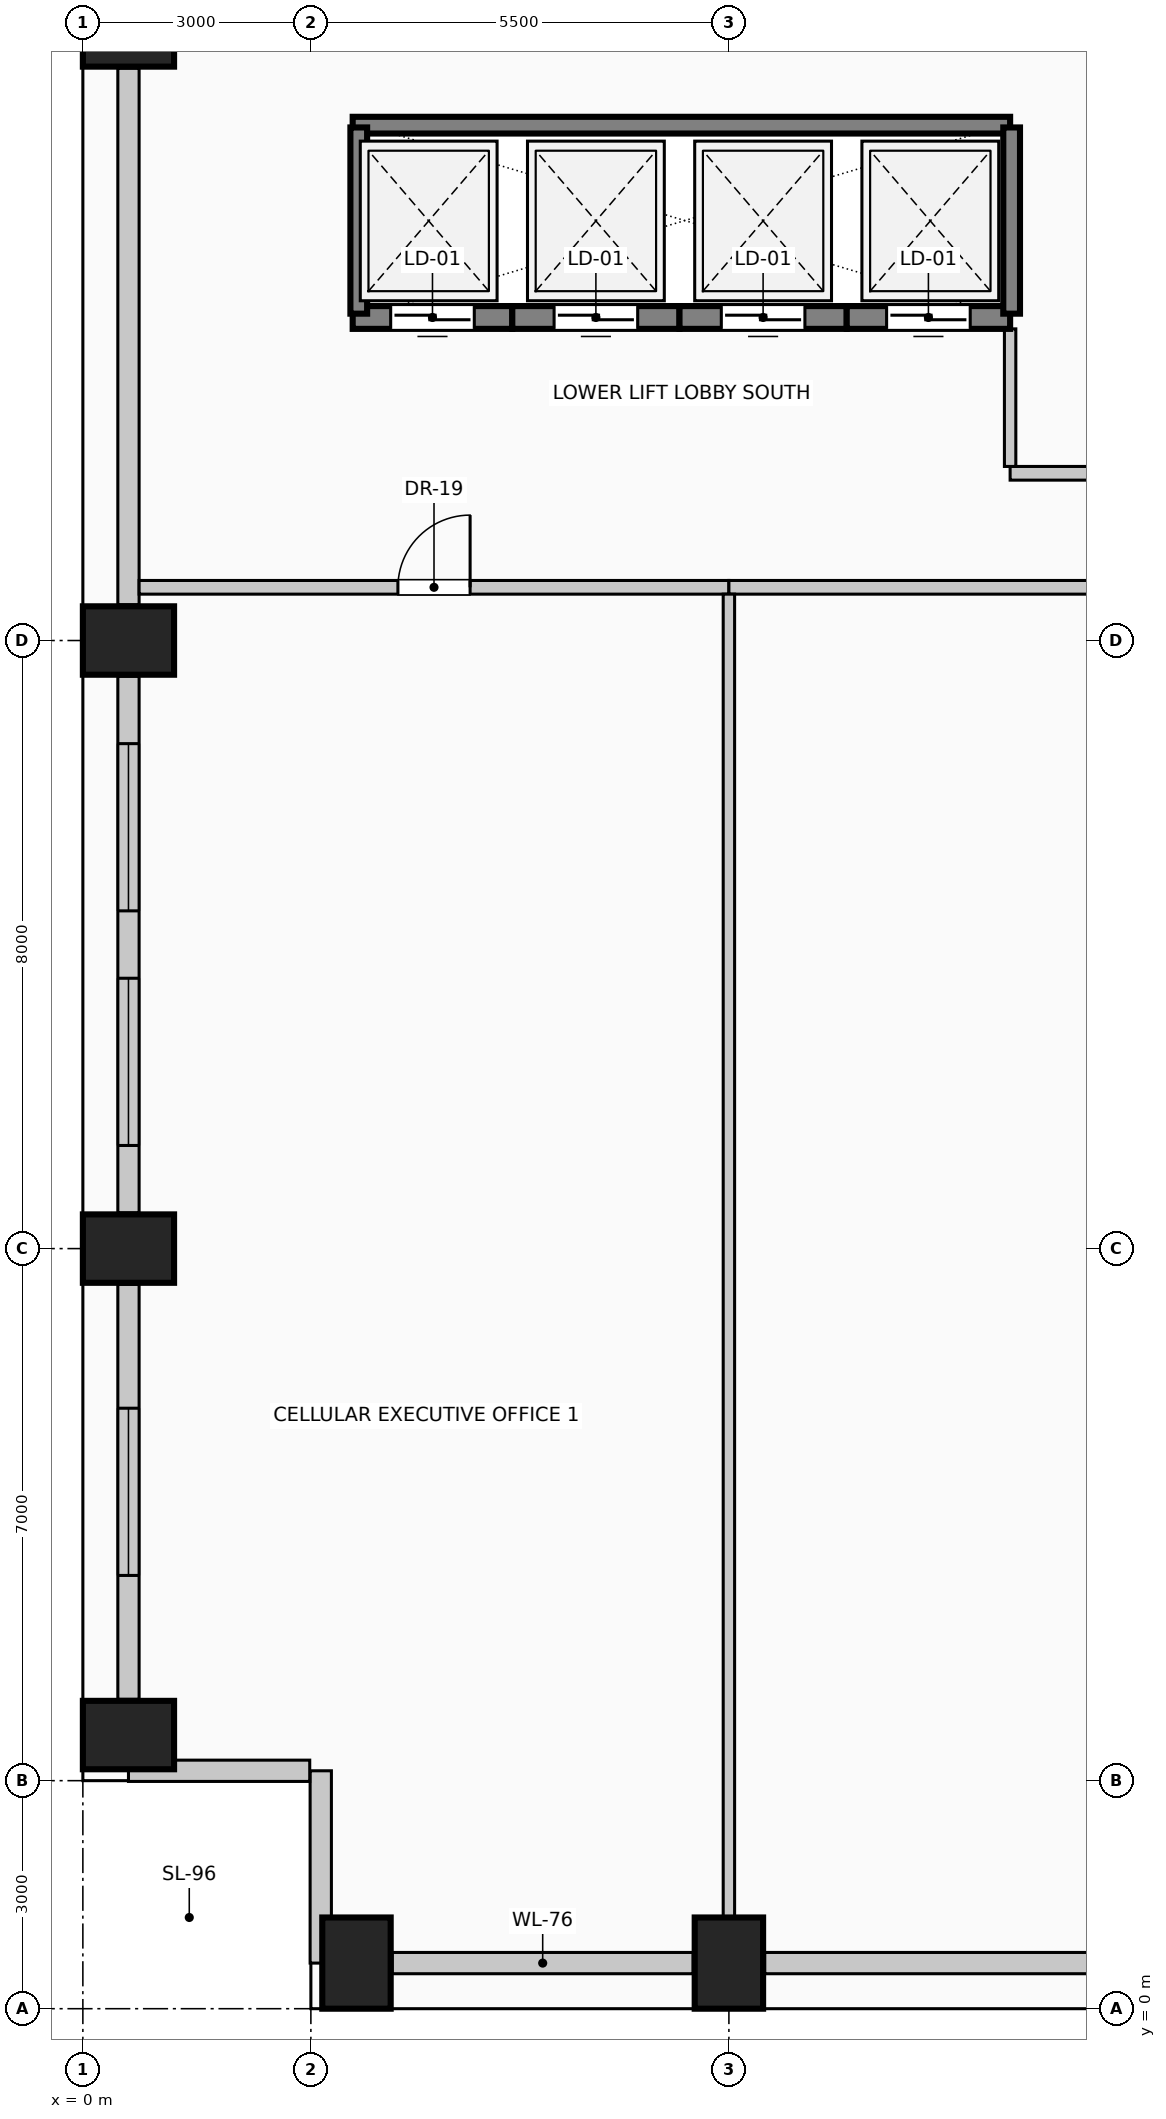
"""IFC4 building model, lengths in metres.
Left out: names, types, materials, properties, quantities, classifications, styles, units other than length and angle.
Written with IfcOpenShell. Run it as: python <this file> out.ifc"""

import sys

from ifc_helpers import new_model, si_unit, direction, frame, frame_2d, origin, origin_2d, place, context, subcontext, project, spatial, rectangle, extrude, element, fill, save


model = new_model("IFC4")
c1 = context("Model", 3, precision=1e-05, world=origin(), true_north=direction((0.0, 1.0)))
c2 = subcontext(c1, "Body", "Model", "MODEL_VIEW")
j1 = project(units=[si_unit("LENGTHUNIT", "METRE"), si_unit("PLANEANGLEUNIT", "RADIAN")], contexts=[c1])
p1 = place(None, origin())
s1 = spatial("IfcSite", under=j1, at=p1, CompositionType="ELEMENT")
p2 = place(p1, origin())
s2 = spatial("IfcBuilding", under=s1, at=p2, CompositionType="ELEMENT")
p3 = place(p2, frame((0.0, 0.0, 66.6)))
s3 = spatial("IfcBuildingStorey", under=s2, at=p3, CompositionType="ELEMENT", Elevation=66.6)
for number, where, z_axis, x_axis in (
    (1, (3.6, 0.6, 0.0), (0.0, 0.0, 1.0), (1.0, 0.0, 0.0)),
    (2, (8.5, 0.6, 0.0), (0.0, 0.0, 1.0), (1.0, 0.0, 0.0)),
    (3, (0.6, 3.6, 0.0), (0.0, 0.0, 1.0), (0.0, 1.0, 0.0)),
    (4, (0.6, 10.0, 0.0), (0.0, 0.0, 1.0), (0.0, 1.0, 0.0)),
    (5, (0.6, 18.0, 0.0), (0.0, 0.0, 1.0), (0.0, 1.0, 0.0)),
    (6, (0.6, 26.0, 0.0), (0.0, 0.0, 1.0), (0.0, 1.0, 0.0)),
):
    element("IfcColumn", number, at=place(p3, frame(where, z_axis=z_axis, x_axis=x_axis)), inside=s3, PredefinedType="COLUMN", context=c2, shape_type="SweptSolid", body=[
        extrude(rectangle(XDim=0.9, YDim=1.2, at=origin_2d()), origin(), (0.0, 0.0, 1.0), 4.0),
    ])
p4 = place(p3, frame((8.03, 0.6, 0.0), z_axis=(0.0, 0.0, 1.0), x_axis=(-1.0, 0.0, 0.0)))
e7 = element("IfcWall", 7, at=p4, inside=s3, PredefinedType="SOLIDWALL", context=c2, shape_type="SweptSolid", body=[
    extrude(rectangle(XDim=3.96, YDim=0.28, at=frame_2d((1.98, 0.0))), origin(), (0.0, 0.0, 1.0), 2.85),
])
p5 = place(p3, frame((13.53, 0.6, 0.0), z_axis=(0.0, 0.0, 1.0), x_axis=(-1.0, 0.0, 0.0)))
e8 = element("IfcWall", 8, at=p5, inside=s3, PredefinedType="SOLIDWALL", context=c2, shape_type="SweptSolid", body=[
    extrude(rectangle(XDim=4.56, YDim=0.28, at=frame_2d((2.28, 0.0))), origin(), (0.0, 0.0, 1.0), 2.85),
])
p6 = place(p3, frame((0.6, 4.07, 0.0), z_axis=(0.0, 0.0, 1.0), x_axis=(0.0, 1.0, 0.0)))
e9 = element("IfcWall", 9, at=p6, inside=s3, PredefinedType="SOLIDWALL", context=c2, shape_type="SweptSolid", body=[
    extrude(rectangle(XDim=5.46, YDim=0.28, at=frame_2d((2.73, 0.0))), origin(), (0.0, 0.0, 1.0), 2.85),
])
p7 = place(p6, frame((1.63, 0.0, 0.5)))
e10 = element("IfcOpeningElement", 10, at=p7, cuts=e9, PredefinedType="OPENING", context=c2, shape_type="SweptSolid", body=[
    extrude(rectangle(XDim=2.2, YDim=1.95, at=frame_2d((1.1, 0.975))), frame((0.0, 0.15, 0.0), z_axis=(0.0, -1.0, 0.0), x_axis=(1.0, 0.0, 0.0)), (0.0, 0.0, 1.0), 0.3),
])
p8 = place(p3, frame((0.6, 10.47, 0.0), z_axis=(0.0, 0.0, 1.0), x_axis=(0.0, 1.0, 0.0)))
e11 = element("IfcWall", 11, at=p8, inside=s3, PredefinedType="SOLIDWALL", context=c2, shape_type="SweptSolid", body=[
    extrude(rectangle(XDim=7.06, YDim=0.28, at=frame_2d((3.53, 0.0))), origin(), (0.0, 0.0, 1.0), 2.85),
])
p9 = place(p8, frame((0.887, 0.0, 0.5)))
e12 = element("IfcOpeningElement", 12, at=p9, cuts=e11, PredefinedType="OPENING", context=c2, shape_type="SweptSolid", body=[
    extrude(rectangle(XDim=2.2, YDim=1.95, at=frame_2d((1.1, 0.975))), frame((0.0, 0.15, 0.0), z_axis=(0.0, -1.0, 0.0), x_axis=(1.0, 0.0, 0.0)), (0.0, 0.0, 1.0), 0.3),
])
p10 = place(p8, frame((3.973, 0.0, 0.5)))
e13 = element("IfcOpeningElement", 13, at=p10, cuts=e11, PredefinedType="OPENING", context=c2, shape_type="SweptSolid", body=[
    extrude(rectangle(XDim=2.2, YDim=1.95, at=frame_2d((1.1, 0.975))), frame((0.0, 0.15, 0.0), z_axis=(0.0, -1.0, 0.0), x_axis=(1.0, 0.0, 0.0)), (0.0, 0.0, 1.0), 0.3),
])
p11 = place(p3, frame((0.6, 18.47, 0.0), z_axis=(0.0, 0.0, 1.0), x_axis=(0.0, 1.0, 0.0)))
e14 = element("IfcWall", 14, at=p11, inside=s3, PredefinedType="SOLIDWALL", context=c2, shape_type="SweptSolid", body=[
    extrude(rectangle(XDim=7.06, YDim=0.28, at=frame_2d((3.53, 0.0))), origin(), (0.0, 0.0, 1.0), 2.85),
])
p12 = place(p3, frame((3.13, 0.6, 0.0), z_axis=(0.0, 0.0, 1.0), x_axis=(0.0, 1.0, 0.0)))
e15 = element("IfcWall", 15, at=p12, inside=s3, PredefinedType="SOLIDWALL", context=c2, shape_type="SweptSolid", body=[
    extrude(rectangle(XDim=2.53, YDim=0.28, at=frame_2d((1.265, 0.0))), origin(), (0.0, 0.0, 1.0), 3.7),
])
p13 = place(p3, frame((2.985, 3.13, 0.0), z_axis=(0.0, 0.0, 1.0), x_axis=(-1.0, 0.0, 0.0)))
e16 = element("IfcWall", 16, at=p13, inside=s3, PredefinedType="SOLIDWALL", context=c2, shape_type="SweptSolid", body=[
    extrude(rectangle(XDim=2.385, YDim=0.28, at=frame_2d((1.192, 0.0))), origin(), (0.0, 0.0, 1.0), 3.7),
])
p14 = place(p3, frame((5.65, 22.25, 0.0), z_axis=(0.0, 0.0, 1.0), x_axis=(-1.0, 0.0, 0.0)))
e17 = element("IfcWall", 17, at=p14, inside=s3, PredefinedType="SOLIDWALL", context=c2, shape_type="SweptSolid", body=[
    extrude(rectangle(XDim=2.1, YDim=0.3, at=frame_2d((1.05, 0.0))), origin(), (0.0, 0.0, 1.0), 4.0),
])
p15 = place(p14, frame((0.5, 0.0, 0.0)))
e18 = element("IfcOpeningElement", 18, at=p15, cuts=e17, PredefinedType="OPENING", context=c2, shape_type="SweptSolid", body=[
    extrude(rectangle(XDim=1.1, YDim=2.2, at=frame_2d((0.55, 1.1))), frame((0.0, 0.16, 0.0), z_axis=(0.0, -1.0, 0.0), x_axis=(1.0, 0.0, 0.0)), (0.0, 0.0, 1.0), 0.32),
])
p16 = place(p3, frame((7.85, 22.25, 0.0), z_axis=(0.0, 0.0, 1.0), x_axis=(-1.0, 0.0, 0.0)))
e19 = element("IfcWall", 19, at=p16, inside=s3, PredefinedType="SOLIDWALL", context=c2, shape_type="SweptSolid", body=[
    extrude(rectangle(XDim=2.2, YDim=0.3, at=frame_2d((1.1, 0.0))), origin(), (0.0, 0.0, 1.0), 4.0),
])
p17 = place(p16, frame((0.55, 0.0, 0.0)))
e20 = element("IfcOpeningElement", 20, at=p17, cuts=e19, PredefinedType="OPENING", context=c2, shape_type="SweptSolid", body=[
    extrude(rectangle(XDim=1.1, YDim=2.2, at=frame_2d((0.55, 1.1))), frame((0.0, 0.16, 0.0), z_axis=(0.0, -1.0, 0.0), x_axis=(1.0, 0.0, 0.0)), (0.0, 0.0, 1.0), 0.32),
])
p18 = place(p3, frame((10.05, 22.25, 0.0), z_axis=(0.0, 0.0, 1.0), x_axis=(-1.0, 0.0, 0.0)))
e21 = element("IfcWall", 21, at=p18, inside=s3, PredefinedType="SOLIDWALL", context=c2, shape_type="SweptSolid", body=[
    extrude(rectangle(XDim=2.2, YDim=0.3, at=frame_2d((1.1, 0.0))), origin(), (0.0, 0.0, 1.0), 4.0),
])
p19 = place(p18, frame((0.55, 0.0, 0.0)))
e22 = element("IfcOpeningElement", 22, at=p19, cuts=e21, PredefinedType="OPENING", context=c2, shape_type="SweptSolid", body=[
    extrude(rectangle(XDim=1.1, YDim=2.2, at=frame_2d((0.55, 1.1))), frame((0.0, 0.16, 0.0), z_axis=(0.0, -1.0, 0.0), x_axis=(1.0, 0.0, 0.0)), (0.0, 0.0, 1.0), 0.32),
])
p20 = place(p3, frame((12.2, 22.25, 0.0), z_axis=(0.0, 0.0, 1.0), x_axis=(-1.0, 0.0, 0.0)))
e23 = element("IfcWall", 23, at=p20, inside=s3, PredefinedType="SOLIDWALL", context=c2, shape_type="SweptSolid", body=[
    extrude(rectangle(XDim=2.15, YDim=0.3, at=frame_2d((1.075, 0.0))), origin(), (0.0, 0.0, 1.0), 4.0),
])
p21 = place(p20, frame((0.525, 0.0, 0.0)))
e24 = element("IfcOpeningElement", 24, at=p21, cuts=e23, PredefinedType="OPENING", context=c2, shape_type="SweptSolid", body=[
    extrude(rectangle(XDim=1.1, YDim=2.2, at=frame_2d((0.55, 1.1))), frame((0.0, 0.16, 0.0), z_axis=(0.0, -1.0, 0.0), x_axis=(1.0, 0.0, 0.0)), (0.0, 0.0, 1.0), 0.32),
])
p22 = place(p3, frame((3.55, 24.78, 0.0), z_axis=(0.0, 0.0, 1.0), x_axis=(1.0, 0.0, 0.0)))
e25 = element("IfcWall", 25, at=p22, inside=s3, PredefinedType="SOLIDWALL", context=c2, shape_type="SweptSolid", body=[
    extrude(rectangle(XDim=8.65, YDim=0.22, at=frame_2d((4.325, 0.0))), origin(), (0.0, 0.0, 1.0), 4.0),
])
for number, where, z_axis, x_axis in (
    (26, (3.63, 22.3, 0.0), (0.0, 0.0, 1.0), (0.0, 1.0, 0.0)),
    (27, (12.22, 22.3, 0.0), (0.0, 0.0, 1.0), (0.0, 1.0, 0.0)),
):
    element("IfcWall", number, at=place(p3, frame(where, z_axis=z_axis, x_axis=x_axis)), inside=s3, PredefinedType="SOLIDWALL", context=c2, shape_type="SweptSolid", body=[
        extrude(rectangle(XDim=2.45, YDim=0.22, at=frame_2d((1.225, 0.0))), origin(), (0.0, 0.0, 1.0), 4.0),
    ])
p23 = place(p3, frame((0.74, 18.7, 0.0), z_axis=(0.0, 0.0, 1.0), x_axis=(1.0, 0.0, 0.0)))
e28 = element("IfcWall", 28, at=p23, inside=s3, PredefinedType="PARTITIONING", context=c2, shape_type="SweptSolid", body=[
    extrude(rectangle(XDim=7.76, YDim=0.18, at=frame_2d((3.88, 0.0))), origin(), (0.0, 0.0, 1.0), 3.7),
])
p24 = place(p23, frame((3.405, 0.0, 0.0)))
e29 = element("IfcOpeningElement", 29, at=p24, cuts=e28, PredefinedType="OPENING", context=c2, shape_type="SweptSolid", body=[
    extrude(rectangle(XDim=0.95, YDim=2.15, at=frame_2d((0.475, 1.075))), frame((0.0, 0.1, 0.0), z_axis=(0.0, -1.0, 0.0), x_axis=(1.0, 0.0, 0.0)), (0.0, 0.0, 1.0), 0.2),
])
p25 = place(p3, frame((8.5, 18.7, 0.0), z_axis=(0.0, 0.0, 1.0), x_axis=(1.0, 0.0, 0.0)))
e30 = element("IfcWall", 30, at=p25, inside=s3, PredefinedType="PARTITIONING", context=c2, shape_type="SweptSolid", body=[
    extrude(rectangle(XDim=13.9, YDim=0.18, at=frame_2d((6.95, 0.0))), origin(), (0.0, 0.0, 1.0), 3.7),
])
p26 = place(p25, frame((4.985, 0.0, 0.0)))
e31 = element("IfcOpeningElement", 31, at=p26, cuts=e30, PredefinedType="OPENING", context=c2, shape_type="SweptSolid", body=[
    extrude(rectangle(XDim=1.05, YDim=2.15, at=frame_2d((0.525, 1.075))), frame((0.0, 0.1, 0.0), z_axis=(0.0, -1.0, 0.0), x_axis=(1.0, 0.0, 0.0)), (0.0, 0.0, 1.0), 0.2),
])
p27 = place(p3, frame((12.2, 20.2, 0.0), z_axis=(0.0, 0.0, 1.0), x_axis=(1.0, 0.0, 0.0)))
e32 = element("IfcWall", 32, at=p27, inside=s3, PredefinedType="PARTITIONING", context=c2, shape_type="SweptSolid", body=[
    extrude(rectangle(XDim=4.45, YDim=0.18, at=frame_2d((2.225, 0.0))), origin(), (0.0, 0.0, 1.0), 3.7),
])
p28 = place(p3, frame((8.5, 1.2, 0.0), z_axis=(0.0, 0.0, 1.0), x_axis=(0.0, 1.0, 0.0)))
e33 = element("IfcWall", 33, at=p28, inside=s3, PredefinedType="PARTITIONING", context=c2, shape_type="SweptSolid", body=[
    extrude(rectangle(XDim=17.41, YDim=0.15, at=frame_2d((8.705, 0.0))), origin(), (0.0, 0.0, 1.0), 3.7),
])
p29 = place(p3, frame((12.2, 20.29, 0.0), z_axis=(0.0, 0.0, 1.0), x_axis=(0.0, 1.0, 0.0)))
e34 = element("IfcWall", 34, at=p29, inside=s3, PredefinedType="PARTITIONING", context=c2, shape_type="SweptSolid", body=[
    extrude(rectangle(XDim=1.81, YDim=0.15, at=frame_2d((0.905, 0.0))), origin(), (0.0, 0.0, 1.0), 3.7),
])
p30 = place(p7, origin())
e35 = element("IfcWindow", 35, at=p30, inside=s3, PartitioningType="SINGLE_PANEL", PredefinedType="WINDOW", context=c2, shape_type="SweptSolid", body=[
    extrude(rectangle(XDim=2.2, YDim=1.95, at=frame_2d((1.1, 0.975))), frame((0.0, 0.03, 0.0), z_axis=(0.0, -1.0, 0.0), x_axis=(1.0, 0.0, 0.0)), (0.0, 0.0, 1.0), 0.06),
])
fill(e10, e35)
p31 = place(p9, origin())
e36 = element("IfcWindow", 36, at=p31, inside=s3, PartitioningType="SINGLE_PANEL", PredefinedType="WINDOW", context=c2, shape_type="SweptSolid", body=[
    extrude(rectangle(XDim=2.2, YDim=1.95, at=frame_2d((1.1, 0.975))), frame((0.0, 0.03, 0.0), z_axis=(0.0, -1.0, 0.0), x_axis=(1.0, 0.0, 0.0)), (0.0, 0.0, 1.0), 0.06),
])
fill(e12, e36)
p32 = place(p10, origin())
e37 = element("IfcWindow", 37, at=p32, inside=s3, PartitioningType="SINGLE_PANEL", PredefinedType="WINDOW", context=c2, shape_type="SweptSolid", body=[
    extrude(rectangle(XDim=2.2, YDim=1.95, at=frame_2d((1.1, 0.975))), frame((0.0, 0.03, 0.0), z_axis=(0.0, -1.0, 0.0), x_axis=(1.0, 0.0, 0.0)), (0.0, 0.0, 1.0), 0.06),
])
fill(e13, e37)
p33 = place(p15, origin())
e38 = element("IfcDoor", 38, at=p33, inside=s3, OperationType="SLIDING_TO_LEFT", PredefinedType="DOOR", context=c2, shape_type="SweptSolid", body=[
    extrude(rectangle(XDim=1.1, YDim=2.2, at=frame_2d((0.55, 1.1))), frame((0.0, 0.025, 0.0), z_axis=(0.0, -1.0, 0.0), x_axis=(1.0, 0.0, 0.0)), (0.0, 0.0, 1.0), 0.05),
])
fill(e18, e38)
p34 = place(p17, origin())
e39 = element("IfcDoor", 39, at=p34, inside=s3, OperationType="SLIDING_TO_RIGHT", PredefinedType="DOOR", context=c2, shape_type="SweptSolid", body=[
    extrude(rectangle(XDim=1.1, YDim=2.2, at=frame_2d((0.55, 1.1))), frame((0.0, 0.025, 0.0), z_axis=(0.0, -1.0, 0.0), x_axis=(1.0, 0.0, 0.0)), (0.0, 0.0, 1.0), 0.05),
])
fill(e20, e39)
p35 = place(p19, origin())
e40 = element("IfcDoor", 40, at=p35, inside=s3, OperationType="SLIDING_TO_LEFT", PredefinedType="DOOR", context=c2, shape_type="SweptSolid", body=[
    extrude(rectangle(XDim=1.1, YDim=2.2, at=frame_2d((0.55, 1.1))), frame((0.0, 0.025, 0.0), z_axis=(0.0, -1.0, 0.0), x_axis=(1.0, 0.0, 0.0)), (0.0, 0.0, 1.0), 0.05),
])
fill(e22, e40)
p36 = place(p21, origin())
e41 = element("IfcDoor", 41, at=p36, inside=s3, OperationType="SLIDING_TO_RIGHT", PredefinedType="DOOR", context=c2, shape_type="SweptSolid", body=[
    extrude(rectangle(XDim=1.1, YDim=2.2, at=frame_2d((0.55, 1.1))), frame((0.0, 0.025, 0.0), z_axis=(0.0, -1.0, 0.0), x_axis=(1.0, 0.0, 0.0)), (0.0, 0.0, 1.0), 0.05),
])
fill(e24, e41)
p37 = place(p24, origin())
e42 = element("IfcDoor", 42, at=p37, inside=s3, OperationType="SINGLE_SWING_RIGHT", PredefinedType="DOOR", context=c2, shape_type="SweptSolid", body=[
    extrude(rectangle(XDim=0.95, YDim=2.15, at=frame_2d((0.475, 1.075))), frame((0.0, 0.025, 0.0), z_axis=(0.0, -1.0, 0.0), x_axis=(1.0, 0.0, 0.0)), (0.0, 0.0, 1.0), 0.05),
])
fill(e29, e42)
save(model, sys.argv[1])
